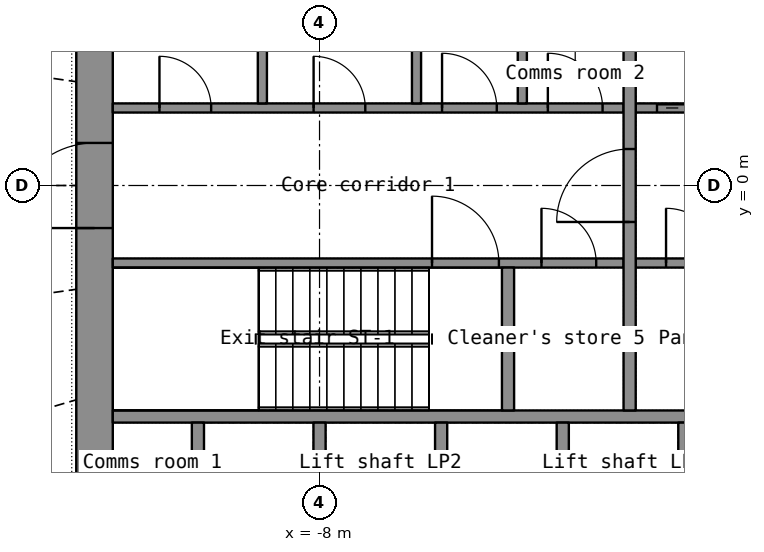
"""IFC4 building model, lengths in metres.
Left out: names, types, materials, properties, quantities, classifications, styles, units other than length and angle.
Written with IfcOpenShell. Run it as: python <this file> out.ifc"""

import sys

from ifc_helpers import new_model, si_unit, direction, frame, frame_2d, origin, place, context, subcontext, project, spatial, rectangle, extrude, element, fill, save


model = new_model("IFC4")
c1 = context("Model", 3, precision=1e-05, world=origin(), true_north=direction((0.0, 1.0)))
c2 = subcontext(c1, "Body", "Model", "MODEL_VIEW")
j1 = project(units=[si_unit("LENGTHUNIT", "METRE"), si_unit("PLANEANGLEUNIT", "RADIAN")], contexts=[c1])
p1 = place(None, origin())
s1 = spatial("IfcSite", under=j1, at=p1, CompositionType="ELEMENT")
p2 = place(p1, origin())
s2 = spatial("IfcBuilding", under=s1, at=p2, CompositionType="ELEMENT")
p3 = place(p2, frame((0.0, 0.0, 85.2)))
s3 = spatial("IfcBuildingStorey", under=s2, at=p3, CompositionType="ELEMENT", Elevation=85.2)
p4 = place(p3, frame((-11.7, -7.2, 0.0), z_axis=(0.0, 0.0, 1.0), x_axis=(0.0, 1.0, 0.0)))
e1 = element("IfcWall", 1, at=p4, inside=s3, PredefinedType="SHEAR", context=c2, shape_type="SweptSolid", body=[
    extrude(rectangle(XDim=14.4, YDim=0.6, at=frame_2d((7.2, 0.0))), origin(), (0.0, 0.0, 1.0), 7.0),
])
p5 = place(p4, frame((6.5, 0.0, 0.0)))
e2 = element("IfcOpeningElement", 2, at=p5, cuts=e1, PredefinedType="OPENING", context=c2, shape_type="SweptSolid", body=[
    extrude(rectangle(XDim=1.4, YDim=2.2, at=frame_2d((0.7, 1.1))), frame((0.0, 0.31, 0.0), z_axis=(0.0, -1.0, 0.0), x_axis=(1.0, 0.0, 0.0)), (0.0, 0.0, 1.0), 0.62),
])
p6 = place(p3, frame((-11.4, -3.8, 0.0), z_axis=(0.0, 0.0, 1.0), x_axis=(1.0, 0.0, 0.0)))
e3 = element("IfcWall", 3, at=p6, inside=s3, PredefinedType="SHEAR", context=c2, shape_type="SweptSolid", body=[
    extrude(rectangle(XDim=22.8, YDim=0.2, at=frame_2d((11.4, 0.0))), origin(), (0.0, 0.0, 1.0), 7.0),
])
for number, where, z_axis, x_axis in (
    (4, (-10.0, -6.6, 0.0), (0.0, 0.0, 1.0), (0.0, 1.0, 0.0)),
    (5, (-8.0, -6.6, 0.0), (0.0, 0.0, 1.0), (0.0, 1.0, 0.0)),
    (6, (-6.0, -6.6, 0.0), (0.0, 0.0, 1.0), (0.0, 1.0, 0.0)),
    (7, (-4.0, -6.6, 0.0), (0.0, 0.0, 1.0), (0.0, 1.0, 0.0)),
    (8, (-2.0, -6.6, 0.0), (0.0, 0.0, 1.0), (0.0, 1.0, 0.0)),
):
    element("IfcWall", number, at=place(p3, frame(where, z_axis=z_axis, x_axis=x_axis)), inside=s3, PredefinedType="SHEAR", context=c2, shape_type="SweptSolid", body=[
        extrude(rectangle(XDim=2.7, YDim=0.2, at=frame_2d((1.35, 0.0))), origin(), (0.0, 0.0, 1.0), 7.0),
    ])
p7 = place(p3, frame((-11.4, -1.275, 0.0), z_axis=(0.0, 0.0, 1.0), x_axis=(1.0, 0.0, 0.0)))
e9 = element("IfcWall", 9, at=p7, inside=s3, PredefinedType="SHEAR", context=c2, shape_type="SweptSolid", body=[
    extrude(rectangle(XDim=8.4, YDim=0.15, at=frame_2d((4.2, 0.0))), origin(), (0.0, 0.0, 1.0), 7.0),
])
p8 = place(p7, frame((5.25, 0.0, 0.0)))
e10 = element("IfcOpeningElement", 10, at=p8, cuts=e9, PredefinedType="OPENING", context=c2, shape_type="SweptSolid", body=[
    extrude(rectangle(XDim=1.1, YDim=2.15, at=frame_2d((0.55, 1.075))), frame((0.0, 0.085, 0.0), z_axis=(0.0, -1.0, 0.0), x_axis=(1.0, 0.0, 0.0)), (0.0, 0.0, 1.0), 0.17),
])
p9 = place(p7, frame((7.05, 0.0, 0.0)))
e11 = element("IfcOpeningElement", 11, at=p9, cuts=e9, PredefinedType="OPENING", context=c2, shape_type="SweptSolid", body=[
    extrude(rectangle(XDim=0.9, YDim=2.1, at=frame_2d((0.45, 1.05))), frame((0.0, 0.085, 0.0), z_axis=(0.0, -1.0, 0.0), x_axis=(1.0, 0.0, 0.0)), (0.0, 0.0, 1.0), 0.17),
])
p10 = place(p3, frame((-2.8, -1.275, 0.0), z_axis=(0.0, 0.0, 1.0), x_axis=(1.0, 0.0, 0.0)))
e12 = element("IfcWall", 12, at=p10, inside=s3, PredefinedType="SHEAR", context=c2, shape_type="SweptSolid", body=[
    extrude(rectangle(XDim=5.6, YDim=0.15, at=frame_2d((2.8, 0.0))), origin(), (0.0, 0.0, 1.0), 7.0),
])
p11 = place(p10, frame((4.15, 0.0, 0.0)))
e13 = element("IfcOpeningElement", 13, at=p11, cuts=e12, PredefinedType="OPENING", context=c2, shape_type="SweptSolid", body=[
    extrude(rectangle(XDim=1.1, YDim=2.2, at=frame_2d((0.55, 1.1))), frame((0.0, 0.085, 0.0), z_axis=(0.0, -1.0, 0.0), x_axis=(1.0, 0.0, 0.0)), (0.0, 0.0, 1.0), 0.17),
])
p12 = place(p10, frame((0.499, 0.0, 0.0)))
e14 = element("IfcOpeningElement", 14, at=p12, cuts=e12, PredefinedType="OPENING", context=c2, shape_type="SweptSolid", body=[
    extrude(rectangle(XDim=0.9, YDim=2.1, at=frame_2d((0.45, 1.05))), frame((0.0, 0.085, 0.0), z_axis=(0.0, -1.0, 0.0), x_axis=(1.0, 0.0, 0.0)), (0.0, 0.0, 1.0), 0.17),
])
p13 = place(p10, frame((2.374, 0.0, 0.0)))
e15 = element("IfcOpeningElement", 15, at=p13, cuts=e12, PredefinedType="OPENING", context=c2, shape_type="SweptSolid", body=[
    extrude(rectangle(XDim=0.9, YDim=2.1, at=frame_2d((0.45, 1.05))), frame((0.0, 0.085, 0.0), z_axis=(0.0, -1.0, 0.0), x_axis=(1.0, 0.0, 0.0)), (0.0, 0.0, 1.0), 0.17),
])
p14 = place(p3, frame((-11.4, 1.275, 0.0), z_axis=(0.0, 0.0, 1.0), x_axis=(1.0, 0.0, 0.0)))
e16 = element("IfcWall", 16, at=p14, inside=s3, PredefinedType="PARTITIONING", context=c2, shape_type="SweptSolid", body=[
    extrude(rectangle(XDim=8.4, YDim=0.15, at=frame_2d((4.2, 0.0))), origin(), (0.0, 0.0, 1.0), 7.0),
])
p15 = place(p14, frame((0.768, 0.0, 0.0)))
e17 = element("IfcOpeningElement", 17, at=p15, cuts=e16, PredefinedType="OPENING", context=c2, shape_type="SweptSolid", body=[
    extrude(rectangle(XDim=0.85, YDim=2.1, at=frame_2d((0.425, 1.05))), frame((0.0, 0.085, 0.0), z_axis=(0.0, -1.0, 0.0), x_axis=(1.0, 0.0, 0.0)), (0.0, 0.0, 1.0), 0.17),
])
p16 = place(p14, frame((3.302, 0.0, 0.0)))
e18 = element("IfcOpeningElement", 18, at=p16, cuts=e16, PredefinedType="OPENING", context=c2, shape_type="SweptSolid", body=[
    extrude(rectangle(XDim=0.85, YDim=2.1, at=frame_2d((0.425, 1.05))), frame((0.0, 0.085, 0.0), z_axis=(0.0, -1.0, 0.0), x_axis=(1.0, 0.0, 0.0)), (0.0, 0.0, 1.0), 0.17),
])
p17 = place(p14, frame((5.415, 0.0, 0.0)))
e19 = element("IfcOpeningElement", 19, at=p17, cuts=e16, PredefinedType="OPENING", context=c2, shape_type="SweptSolid", body=[
    extrude(rectangle(XDim=0.9, YDim=2.1, at=frame_2d((0.45, 1.05))), frame((0.0, 0.085, 0.0), z_axis=(0.0, -1.0, 0.0), x_axis=(1.0, 0.0, 0.0)), (0.0, 0.0, 1.0), 0.17),
])
p18 = place(p14, frame((7.155, 0.0, 0.0)))
e20 = element("IfcOpeningElement", 20, at=p18, cuts=e16, PredefinedType="OPENING", context=c2, shape_type="SweptSolid", body=[
    extrude(rectangle(XDim=0.9, YDim=2.1, at=frame_2d((0.45, 1.05))), frame((0.0, 0.085, 0.0), z_axis=(0.0, -1.0, 0.0), x_axis=(1.0, 0.0, 0.0)), (0.0, 0.0, 1.0), 0.17),
])
p19 = place(p3, frame((-2.8, 1.275, 0.0), z_axis=(0.0, 0.0, 1.0), x_axis=(1.0, 0.0, 0.0)))
e21 = element("IfcWall", 21, at=p19, inside=s3, PredefinedType="SHEAR", context=c2, shape_type="SweptSolid", body=[
    extrude(rectangle(XDim=5.6, YDim=0.15, at=frame_2d((2.8, 0.0))), origin(), (0.0, 0.0, 1.0), 7.0),
])
p20 = place(p19, frame((0.35, 0.0, 0.0)))
e22 = element("IfcOpeningElement", 22, at=p20, cuts=e21, PredefinedType="OPENING", context=c2, shape_type="SweptSolid", body=[
    extrude(rectangle(XDim=1.1, YDim=2.2, at=frame_2d((0.55, 1.1))), frame((0.0, 0.085, 0.0), z_axis=(0.0, -1.0, 0.0), x_axis=(1.0, 0.0, 0.0)), (0.0, 0.0, 1.0), 0.17),
])
p21 = place(p19, frame((2.413, 0.0, 0.0)))
e23 = element("IfcOpeningElement", 23, at=p21, cuts=e21, PredefinedType="OPENING", context=c2, shape_type="SweptSolid", body=[
    extrude(rectangle(XDim=0.9, YDim=2.1, at=frame_2d((0.45, 1.05))), frame((0.0, 0.085, 0.0), z_axis=(0.0, -1.0, 0.0), x_axis=(1.0, 0.0, 0.0)), (0.0, 0.0, 1.0), 0.17),
])
p22 = place(p19, frame((4.288, 0.0, 0.0)))
e24 = element("IfcOpeningElement", 24, at=p22, cuts=e21, PredefinedType="OPENING", context=c2, shape_type="SweptSolid", body=[
    extrude(rectangle(XDim=0.9, YDim=2.1, at=frame_2d((0.45, 1.05))), frame((0.0, 0.085, 0.0), z_axis=(0.0, -1.0, 0.0), x_axis=(1.0, 0.0, 0.0)), (0.0, 0.0, 1.0), 0.17),
])
p23 = place(p3, frame((-2.9, -3.7, 0.0), z_axis=(0.0, 0.0, 1.0), x_axis=(0.0, 1.0, 0.0)))
e25 = element("IfcWall", 25, at=p23, inside=s3, PredefinedType="SHEAR", context=c2, shape_type="SweptSolid", body=[
    extrude(rectangle(XDim=7.4, YDim=0.2, at=frame_2d((3.7, 0.0))), origin(), (0.0, 0.0, 1.0), 7.0),
])
p24 = place(p23, frame((3.1, 0.0, 0.0)))
e26 = element("IfcOpeningElement", 26, at=p24, cuts=e25, PredefinedType="OPENING", context=c2, shape_type="SweptSolid", body=[
    extrude(rectangle(XDim=1.2, YDim=2.2, at=frame_2d((0.6, 1.1))), frame((0.0, 0.11, 0.0), z_axis=(0.0, -1.0, 0.0), x_axis=(1.0, 0.0, 0.0)), (0.0, 0.0, 1.0), 0.22),
])
p25 = place(p3, frame((-4.9, -3.7, 0.0), z_axis=(0.0, 0.0, 1.0), x_axis=(0.0, 1.0, 0.0)))
e27 = element("IfcWall", 27, at=p25, inside=s3, PredefinedType="SHEAR", context=c2, shape_type="SweptSolid", body=[
    extrude(rectangle(XDim=2.35, YDim=0.2, at=frame_2d((1.175, 0.0))), origin(), (0.0, 0.0, 1.0), 7.0),
])
for number, where, z_axis, x_axis in (
    (28, (-8.94, 1.35, 0.0), (0.0, 0.0, 1.0), (0.0, 1.0, 0.0)),
    (29, (-6.405, 1.35, 0.0), (0.0, 0.0, 1.0), (0.0, 1.0, 0.0)),
    (30, (-4.665, 1.35, 0.0), (0.0, 0.0, 1.0), (0.0, 1.0, 0.0)),
):
    element("IfcWall", number, at=place(p3, frame(where, z_axis=z_axis, x_axis=x_axis)), inside=s3, PredefinedType="PARTITIONING", context=c2, shape_type="SweptSolid", body=[
        extrude(rectangle(XDim=2.35, YDim=0.15, at=frame_2d((1.175, 0.0))), origin(), (0.0, 0.0, 1.0), 7.0),
    ])
p26 = place(p5, origin())
e31 = element("IfcDoor", 31, at=p26, inside=s3, OperationType="DOUBLE_DOOR_SINGLE_SWING", PredefinedType="DOOR", context=c2, shape_type="SweptSolid", body=[
    extrude(rectangle(XDim=1.4, YDim=2.2, at=frame_2d((0.7, 1.1))), frame((0.0, 0.025, 0.0), z_axis=(0.0, -1.0, 0.0), x_axis=(1.0, 0.0, 0.0)), (0.0, 0.0, 1.0), 0.05),
])
fill(e2, e31)
p27 = place(p24, origin())
e32 = element("IfcDoor", 32, at=p27, inside=s3, OperationType="SINGLE_SWING_LEFT", PredefinedType="DOOR", context=c2, shape_type="SweptSolid", body=[
    extrude(rectangle(XDim=1.2, YDim=2.2, at=frame_2d((0.6, 1.1))), frame((0.0, 0.025, 0.0), z_axis=(0.0, -1.0, 0.0), x_axis=(1.0, 0.0, 0.0)), (0.0, 0.0, 1.0), 0.05),
])
fill(e26, e32)
p28 = place(p20, origin())
e33 = element("IfcDoor", 33, at=p28, inside=s3, OperationType="DOUBLE_DOOR_SLIDING", PredefinedType="DOOR", context=c2, shape_type="SweptSolid", body=[
    extrude(rectangle(XDim=1.1, YDim=2.2, at=frame_2d((0.55, 1.1))), frame((0.0, 0.025, 0.0), z_axis=(0.0, -1.0, 0.0), x_axis=(1.0, 0.0, 0.0)), (0.0, 0.0, 1.0), 0.05),
])
fill(e22, e33)
p29 = place(p8, origin())
e34 = element("IfcDoor", 34, at=p29, inside=s3, OperationType="SINGLE_SWING_LEFT", PredefinedType="DOOR", context=c2, shape_type="SweptSolid", body=[
    extrude(rectangle(XDim=1.1, YDim=2.15, at=frame_2d((0.55, 1.075))), frame((0.0, 0.025, 0.0), z_axis=(0.0, -1.0, 0.0), x_axis=(1.0, 0.0, 0.0)), (0.0, 0.0, 1.0), 0.05),
])
fill(e10, e34)
p30 = place(p15, origin())
e35 = element("IfcDoor", 35, at=p30, inside=s3, OperationType="SINGLE_SWING_LEFT", PredefinedType="DOOR", context=c2, shape_type="SweptSolid", body=[
    extrude(rectangle(XDim=0.85, YDim=2.1, at=frame_2d((0.425, 1.05))), frame((0.0, 0.025, 0.0), z_axis=(0.0, -1.0, 0.0), x_axis=(1.0, 0.0, 0.0)), (0.0, 0.0, 1.0), 0.05),
])
fill(e17, e35)
p31 = place(p16, origin())
e36 = element("IfcDoor", 36, at=p31, inside=s3, OperationType="SINGLE_SWING_LEFT", PredefinedType="DOOR", context=c2, shape_type="SweptSolid", body=[
    extrude(rectangle(XDim=0.85, YDim=2.1, at=frame_2d((0.425, 1.05))), frame((0.0, 0.025, 0.0), z_axis=(0.0, -1.0, 0.0), x_axis=(1.0, 0.0, 0.0)), (0.0, 0.0, 1.0), 0.05),
])
fill(e18, e36)
p32 = place(p17, origin())
e37 = element("IfcDoor", 37, at=p32, inside=s3, OperationType="SINGLE_SWING_LEFT", PredefinedType="DOOR", context=c2, shape_type="SweptSolid", body=[
    extrude(rectangle(XDim=0.9, YDim=2.1, at=frame_2d((0.45, 1.05))), frame((0.0, 0.025, 0.0), z_axis=(0.0, -1.0, 0.0), x_axis=(1.0, 0.0, 0.0)), (0.0, 0.0, 1.0), 0.05),
])
fill(e19, e37)
p33 = place(p18, origin())
e38 = element("IfcDoor", 38, at=p33, inside=s3, OperationType="SINGLE_SWING_LEFT", PredefinedType="DOOR", context=c2, shape_type="SweptSolid", body=[
    extrude(rectangle(XDim=0.9, YDim=2.1, at=frame_2d((0.45, 1.05))), frame((0.0, 0.025, 0.0), z_axis=(0.0, -1.0, 0.0), x_axis=(1.0, 0.0, 0.0)), (0.0, 0.0, 1.0), 0.05),
])
fill(e20, e38)
p34 = place(p12, origin())
e39 = element("IfcDoor", 39, at=p34, inside=s3, OperationType="SINGLE_SWING_LEFT", PredefinedType="DOOR", context=c2, shape_type="SweptSolid", body=[
    extrude(rectangle(XDim=0.9, YDim=2.1, at=frame_2d((0.45, 1.05))), frame((0.0, 0.025, 0.0), z_axis=(0.0, -1.0, 0.0), x_axis=(1.0, 0.0, 0.0)), (0.0, 0.0, 1.0), 0.05),
])
fill(e14, e39)
p35 = place(p9, origin())
e40 = element("IfcDoor", 40, at=p35, inside=s3, OperationType="SINGLE_SWING_LEFT", PredefinedType="DOOR", context=c2, shape_type="SweptSolid", body=[
    extrude(rectangle(XDim=0.9, YDim=2.1, at=frame_2d((0.45, 1.05))), frame((0.0, 0.025, 0.0), z_axis=(0.0, -1.0, 0.0), x_axis=(1.0, 0.0, 0.0)), (0.0, 0.0, 1.0), 0.05),
])
fill(e11, e40)
save(model, sys.argv[1])
